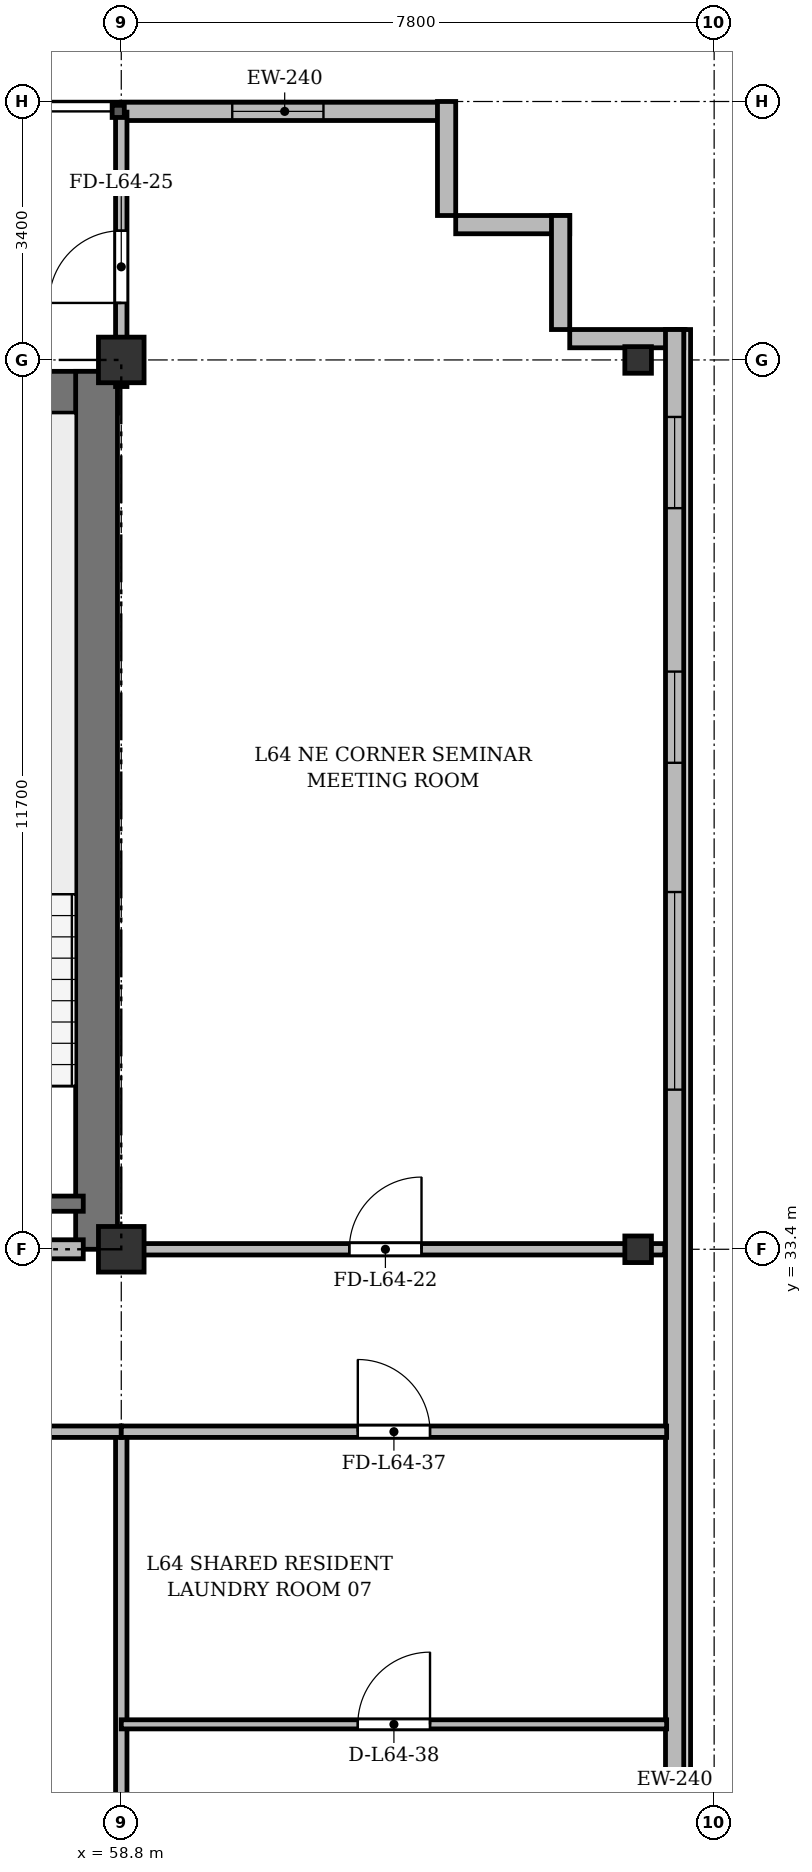
"""IFC4 building model, lengths in metres.
Left out: names, types, materials, properties, quantities, classifications, styles, units other than length and angle.
Written with IfcOpenShell. Run it as: python <this file> out.ifc"""

import sys

from ifc_helpers import new_model, si_unit, direction, frame, frame_2d, origin, origin_2d, place, context, subcontext, project, spatial, rectangle, i_section, extrude, source, transform, mapped, element, fill, save


model = new_model("IFC4")
c1 = context("Model", 3, precision=1e-05, world=origin(), true_north=direction((0.0, 1.0)))
c2 = subcontext(c1, "Body", "Model", "MODEL_VIEW")
j1 = project(units=[si_unit("LENGTHUNIT", "METRE"), si_unit("PLANEANGLEUNIT", "RADIAN")], contexts=[c1])
p1 = place(None, origin())
s1 = spatial("IfcSite", under=j1, at=p1, CompositionType="ELEMENT")
p2 = place(p1, origin())
s2 = spatial("IfcBuilding", under=s1, at=p2, CompositionType="ELEMENT")
p3 = place(p2, frame((0.0, 0.0, 248.7)))
s3 = spatial("IfcBuildingStorey", under=s2, at=p3, CompositionType="ELEMENT", Elevation=248.7)
m1 = source(origin(), c2, "Body", "SweptSolid", [
    extrude(rectangle(XDim=0.6, YDim=0.6, at=origin_2d()), origin(), (0.0, 0.0, 1.0), 3.6),
])
for number, where, z_axis, x_axis in (
    (1, (58.8, 33.4, 0.0), (0.0, 0.0, 1.0), (1.0, 0.0, 0.0)),
    (2, (58.8, 45.1, 0.0), (0.0, 0.0, 1.0), (1.0, 0.0, 0.0)),
):
    element("IfcColumn", number, at=place(p3, frame(where, z_axis=z_axis, x_axis=x_axis)), inside=s3, PredefinedType="COLUMN", context=c2, shape_type="MappedRepresentation", body=[
        mapped(m1, transform((0.0, 0.0, 0.0), x_axis=(1.0, 0.0, 0.0), y_axis=(0.0, 1.0, 0.0), z_axis=(0.0, 0.0, 1.0), scale=1.0)),
    ])
m2 = source(origin(), c2, "Body", "SweptSolid", [
    extrude(i_section(OverallWidth=0.35, OverallDepth=0.35, WebThickness=0.018, FlangeThickness=0.028, at=origin_2d()), origin(), (0.0, 0.0, 1.0), 3.6),
])
for number, where, z_axis, x_axis in (
    (3, (65.6, 33.4, 0.0), (0.0, 0.0, 1.0), (1.0, 0.0, 0.0)),
    (4, (65.6, 45.1, 0.0), (0.0, 0.0, 1.0), (1.0, 0.0, 0.0)),
):
    element("IfcColumn", number, at=place(p3, frame(where, z_axis=z_axis, x_axis=x_axis)), inside=s3, PredefinedType="COLUMN", context=c2, shape_type="MappedRepresentation", body=[
        mapped(m2, transform((0.0, 0.0, 0.0), x_axis=(1.0, 0.0, 0.0), y_axis=(0.0, 1.0, 0.0), z_axis=(0.0, 0.0, 1.0), scale=1.0)),
    ])
p4 = place(p3, frame((58.8, 48.37, 0.0), z_axis=(0.0, 0.0, 1.0), x_axis=(1.0, 0.0, 0.0)))
e5 = element("IfcWall", 5, at=p4, inside=s3, PredefinedType="SOLIDWALL", context=c2, shape_type="SweptSolid", body=[
    extrude(rectangle(XDim=4.3, YDim=0.24, at=frame_2d((2.15, 0.0))), origin(), (0.0, 0.0, 1.0), 3.37),
])
p5 = place(p4, frame((1.46, 0.0, 0.9)))
e6 = element("IfcOpeningElement", 6, at=p5, cuts=e5, PredefinedType="OPENING", context=c2, shape_type="SweptSolid", body=[
    extrude(rectangle(XDim=1.2, YDim=1.65, at=frame_2d((0.6, 0.825))), frame((0.0, 0.13, 0.0), z_axis=(0.0, -1.0, 0.0), x_axis=(1.0, 0.0, 0.0)), (0.0, 0.0, 1.0), 0.26),
])
for number, where, z_axis, x_axis in (
    (7, (63.08, 48.5, 0.0), (0.0, 0.0, 1.0), (0.0, -1.0, 0.0)),
    (8, (63.2, 46.88, 0.0), (0.0, 0.0, 1.0), (1.0, 0.0, 0.0)),
    (9, (64.58, 47.0, 0.0), (0.0, 0.0, 1.0), (0.0, -1.0, 0.0)),
    (10, (64.7, 45.38, 0.0), (0.0, 0.0, 1.0), (1.0, 0.0, 0.0)),
):
    element("IfcWall", number, at=place(p3, frame(where, z_axis=z_axis, x_axis=x_axis)), inside=s3, PredefinedType="SOLIDWALL", context=c2, shape_type="SweptSolid", body=[
        extrude(rectangle(XDim=1.5, YDim=0.24, at=frame_2d((0.75, 0.0))), origin(), (0.0, 0.0, 1.0), 3.37),
    ])
p6 = place(p3, frame((66.08, 45.5, 0.0), z_axis=(0.0, 0.0, 1.0), x_axis=(0.0, -1.0, 0.0)))
e11 = element("IfcWall", 11, at=p6, inside=s3, PredefinedType="SOLIDWALL", context=c2, shape_type="SweptSolid", body=[
    extrude(rectangle(XDim=39.0, YDim=0.24, at=frame_2d((19.5, 0.0))), origin(), (0.0, 0.0, 1.0), 3.37),
])
p7 = place(p6, frame((36.35, 0.0, 0.92)))
e12 = element("IfcOpeningElement", 12, at=p7, cuts=e11, PredefinedType="OPENING", context=c2, shape_type="SweptSolid", body=[
    extrude(rectangle(XDim=1.2, YDim=1.65, at=frame_2d((0.6, 0.825))), frame((0.0, 0.13, 0.0), z_axis=(0.0, -1.0, 0.0), x_axis=(1.0, 0.0, 0.0)), (0.0, 0.0, 1.0), 0.26),
])
p8 = place(p6, frame((32.8, 0.0, 0.92)))
e13 = element("IfcOpeningElement", 13, at=p8, cuts=e11, PredefinedType="OPENING", context=c2, shape_type="SweptSolid", body=[
    extrude(rectangle(XDim=2.6, YDim=1.9, at=frame_2d((1.3, 0.95))), frame((0.0, 0.13, 0.0), z_axis=(0.0, -1.0, 0.0), x_axis=(1.0, 0.0, 0.0)), (0.0, 0.0, 1.0), 0.26),
])
p9 = place(p6, frame((28.6, 0.0, 0.92)))
e14 = element("IfcOpeningElement", 14, at=p9, cuts=e11, PredefinedType="OPENING", context=c2, shape_type="SweptSolid", body=[
    extrude(rectangle(XDim=2.6, YDim=1.9, at=frame_2d((1.3, 0.95))), frame((0.0, 0.13, 0.0), z_axis=(0.0, -1.0, 0.0), x_axis=(1.0, 0.0, 0.0)), (0.0, 0.0, 1.0), 0.26),
])
p10 = place(p6, frame((21.4, 0.0, 0.92)))
e15 = element("IfcOpeningElement", 15, at=p10, cuts=e11, PredefinedType="OPENING", context=c2, shape_type="SweptSolid", body=[
    extrude(rectangle(XDim=2.6, YDim=1.9, at=frame_2d((1.3, 0.95))), frame((0.0, 0.13, 0.0), z_axis=(0.0, -1.0, 0.0), x_axis=(1.0, 0.0, 0.0)), (0.0, 0.0, 1.0), 0.26),
])
p11 = place(p6, frame((7.4, 0.0, 0.92)))
e16 = element("IfcOpeningElement", 16, at=p11, cuts=e11, PredefinedType="OPENING", context=c2, shape_type="SweptSolid", body=[
    extrude(rectangle(XDim=2.6, YDim=1.9, at=frame_2d((1.3, 0.95))), frame((0.0, 0.13, 0.0), z_axis=(0.0, -1.0, 0.0), x_axis=(1.0, 0.0, 0.0)), (0.0, 0.0, 1.0), 0.26),
])
p12 = place(p6, frame((4.5, 0.0, 0.92)))
e17 = element("IfcOpeningElement", 17, at=p12, cuts=e11, PredefinedType="OPENING", context=c2, shape_type="SweptSolid", body=[
    extrude(rectangle(XDim=1.2, YDim=1.65, at=frame_2d((0.6, 0.825))), frame((0.0, 0.13, 0.0), z_axis=(0.0, -1.0, 0.0), x_axis=(1.0, 0.0, 0.0)), (0.0, 0.0, 1.0), 0.26),
])
p13 = place(p6, frame((1.15, 0.0, 0.92)))
e18 = element("IfcOpeningElement", 18, at=p13, cuts=e11, PredefinedType="OPENING", context=c2, shape_type="SweptSolid", body=[
    extrude(rectangle(XDim=1.2, YDim=1.65, at=frame_2d((0.6, 0.825))), frame((0.0, 0.13, 0.0), z_axis=(0.0, -1.0, 0.0), x_axis=(1.0, 0.0, 0.0)), (0.0, 0.0, 1.0), 0.26),
])
p14 = place(p3, frame((15.65, 44.675, 0.0), z_axis=(0.0, 0.0, 1.0), x_axis=(1.0, 0.0, 0.0)))
e19 = element("IfcWall", 19, at=p14, inside=s3, PredefinedType="SHEAR", context=c2, shape_type="SweptSolid", body=[
    extrude(rectangle(XDim=43.1, YDim=0.55, at=frame_2d((21.55, 0.0))), origin(), (0.0, 0.0, 1.0), 3.37),
])
p15 = place(p3, frame((58.475, 33.4, 0.0), z_axis=(0.0, 0.0, 1.0), x_axis=(0.0, 1.0, 0.0)))
e20 = element("IfcWall", 20, at=p15, inside=s3, PredefinedType="SHEAR", context=c2, shape_type="SweptSolid", body=[
    extrude(rectangle(XDim=11.55, YDim=0.55, at=frame_2d((5.775, 0.0))), origin(), (0.0, 0.0, 1.0), 3.37),
])
p16 = place(p3, frame((54.9, 34.0, 0.0), z_axis=(0.0, 0.0, 1.0), x_axis=(1.0, 0.0, 0.0)))
e21 = element("IfcWall", 21, at=p16, inside=s3, PredefinedType="SHEAR", context=c2, shape_type="SweptSolid", body=[
    extrude(rectangle(XDim=3.4, YDim=0.2, at=frame_2d((1.7, 0.0))), origin(), (0.0, 0.0, 1.0), 3.37),
])
p17 = place(p3, frame((47.15, 33.4, 0.0), z_axis=(0.0, 0.0, 1.0), x_axis=(1.0, 0.0, 0.0)))
e22 = element("IfcWall", 22, at=p17, inside=s3, PredefinedType="PARTITIONING", context=c2, shape_type="SweptSolid", body=[
    extrude(rectangle(XDim=11.15, YDim=0.25, at=frame_2d((5.575, 0.0))), origin(), (0.0, 0.0, 1.0), 2.92),
])
p18 = place(p17, frame((0.7, 0.0, 0.0)))
e23 = element("IfcOpeningElement", 23, at=p18, cuts=e22, PredefinedType="OPENING", context=c2, shape_type="SweptSolid", body=[
    extrude(rectangle(XDim=0.95, YDim=2.15, at=frame_2d((0.475, 1.075))), frame((0.0, 0.135, 0.0), z_axis=(0.0, -1.0, 0.0), x_axis=(1.0, 0.0, 0.0)), (0.0, 0.0, 1.0), 0.27),
])
p19 = place(p17, frame((6.0, 0.0, 0.0)))
e24 = element("IfcOpeningElement", 24, at=p19, cuts=e22, PredefinedType="OPENING", context=c2, shape_type="SweptSolid", body=[
    extrude(rectangle(XDim=1.2, YDim=2.15, at=frame_2d((0.6, 1.075))), frame((0.0, 0.135, 0.0), z_axis=(0.0, -1.0, 0.0), x_axis=(1.0, 0.0, 0.0)), (0.0, 0.0, 1.0), 0.27),
])
p20 = place(p3, frame((58.8, 33.4, 0.0), z_axis=(0.0, 0.0, 1.0), x_axis=(1.0, 0.0, 0.0)))
e25 = element("IfcWall", 25, at=p20, inside=s3, PredefinedType="PARTITIONING", context=c2, shape_type="SweptSolid", body=[
    extrude(rectangle(XDim=7.15, YDim=0.15, at=frame_2d((3.575, 0.0))), origin(), (0.0, 0.0, 1.0), 2.92),
])
p21 = place(p20, frame((3.0, 0.0, 0.0)))
e26 = element("IfcOpeningElement", 26, at=p21, cuts=e25, PredefinedType="OPENING", context=c2, shape_type="SweptSolid", body=[
    extrude(rectangle(XDim=0.95, YDim=2.15, at=frame_2d((0.475, 1.075))), frame((0.0, 0.085, 0.0), z_axis=(0.0, -1.0, 0.0), x_axis=(1.0, 0.0, 0.0)), (0.0, 0.0, 1.0), 0.17),
])
p22 = place(p3, frame((58.8, 44.75, 0.0), z_axis=(0.0, 0.0, 1.0), x_axis=(0.0, 1.0, 0.0)))
e27 = element("IfcWall", 27, at=p22, inside=s3, PredefinedType="PARTITIONING", context=c2, shape_type="SweptSolid", body=[
    extrude(rectangle(XDim=3.61, YDim=0.15, at=frame_2d((1.805, 0.0))), origin(), (0.0, 0.0, 1.0), 2.87),
])
p23 = place(p22, frame((1.1, 0.0, 0.0)))
e28 = element("IfcOpeningElement", 28, at=p23, cuts=e27, PredefinedType="OPENING", context=c2, shape_type="SweptSolid", body=[
    extrude(rectangle(XDim=0.95, YDim=2.15, at=frame_2d((0.475, 1.075))), frame((0.0, 0.085, 0.0), z_axis=(0.0, -1.0, 0.0), x_axis=(1.0, 0.0, 0.0)), (0.0, 0.0, 1.0), 0.17),
])
p24 = place(p3, frame((58.8, 3.725, 0.0), z_axis=(0.0, 0.0, 1.0), x_axis=(0.0, 1.0, 0.0)))
e29 = element("IfcWall", 29, at=p24, inside=s3, PredefinedType="PARTITIONING", context=c2, shape_type="SweptSolid", body=[
    extrude(rectangle(XDim=27.275, YDim=0.15, at=frame_2d((13.637, 0.0))), origin(), (0.0, 0.0, 1.0), 2.87),
])
p25 = place(p3, frame((51.0, 31.0, 0.0), z_axis=(0.0, 0.0, 1.0), x_axis=(1.0, 0.0, 0.0)))
e30 = element("IfcWall", 30, at=p25, inside=s3, PredefinedType="PARTITIONING", context=c2, shape_type="SweptSolid", body=[
    extrude(rectangle(XDim=7.8, YDim=0.15, at=frame_2d((3.9, 0.0))), origin(), (0.0, 0.0, 1.0), 2.87),
])
p26 = place(p25, frame((3.333, 0.0, 0.0)))
e31 = element("IfcOpeningElement", 31, at=p26, cuts=e30, PredefinedType="OPENING", context=c2, shape_type="SweptSolid", body=[
    extrude(rectangle(XDim=0.95, YDim=2.15, at=frame_2d((0.475, 1.075))), frame((0.0, 0.085, 0.0), z_axis=(0.0, -1.0, 0.0), x_axis=(1.0, 0.0, 0.0)), (0.0, 0.0, 1.0), 0.17),
])
p27 = place(p3, frame((58.8, 31.0, 0.0), z_axis=(0.0, 0.0, 1.0), x_axis=(1.0, 0.0, 0.0)))
e32 = element("IfcWall", 32, at=p27, inside=s3, PredefinedType="PARTITIONING", context=c2, shape_type="SweptSolid", body=[
    extrude(rectangle(XDim=7.175, YDim=0.15, at=frame_2d((3.587, 0.0))), origin(), (0.0, 0.0, 1.0), 2.87),
])
p28 = place(p27, frame((3.112, 0.0, 0.0)))
e33 = element("IfcOpeningElement", 33, at=p28, cuts=e32, PredefinedType="OPENING", context=c2, shape_type="SweptSolid", body=[
    extrude(rectangle(XDim=0.95, YDim=2.15, at=frame_2d((0.475, 1.075))), frame((0.0, 0.085, 0.0), z_axis=(0.0, -1.0, 0.0), x_axis=(1.0, 0.0, 0.0)), (0.0, 0.0, 1.0), 0.17),
])
p29 = place(p3, frame((58.8, 27.15, 0.0), z_axis=(0.0, 0.0, 1.0), x_axis=(1.0, 0.0, 0.0)))
e34 = element("IfcWall", 34, at=p29, inside=s3, PredefinedType="PARTITIONING", context=c2, shape_type="SweptSolid", body=[
    extrude(rectangle(XDim=7.175, YDim=0.12, at=frame_2d((3.587, 0.0))), origin(), (0.0, 0.0, 1.0), 2.87),
])
p30 = place(p29, frame((3.112, 0.0, 0.0)))
e35 = element("IfcOpeningElement", 35, at=p30, cuts=e34, PredefinedType="OPENING", context=c2, shape_type="SweptSolid", body=[
    extrude(rectangle(XDim=0.95, YDim=2.15, at=frame_2d((0.475, 1.075))), frame((0.0, 0.07, 0.0), z_axis=(0.0, -1.0, 0.0), x_axis=(1.0, 0.0, 0.0)), (0.0, 0.0, 1.0), 0.14),
])
m3 = source(origin(), c2, "Body", "SweptSolid", [
    extrude(rectangle(XDim=1.2, YDim=1.65, at=frame_2d((0.6, 0.825))), frame((0.0, 0.03, 0.0), z_axis=(0.0, -1.0, 0.0), x_axis=(1.0, 0.0, 0.0)), (0.0, 0.0, 1.0), 0.06),
])
p31 = place(p5, origin())
e36 = element("IfcWindow", 36, at=p31, inside=s3, PartitioningType="SINGLE_PANEL", PredefinedType="WINDOW", context=c2, shape_type="MappedRepresentation", body=[
    mapped(m3, transform((0.0, 0.0, 0.0), x_axis=(1.0, 0.0, 0.0), y_axis=(0.0, 1.0, 0.0), z_axis=(0.0, 0.0, 1.0), scale=1.0)),
])
fill(e6, e36)
m4 = source(origin(), c2, "Body", "SweptSolid", [
    extrude(rectangle(XDim=2.6, YDim=1.9, at=frame_2d((1.3, 0.95))), frame((0.0, 0.03, 0.0), z_axis=(0.0, -1.0, 0.0), x_axis=(1.0, 0.0, 0.0)), (0.0, 0.0, 1.0), 0.06),
])
p32 = place(p11, origin())
e37 = element("IfcWindow", 37, at=p32, inside=s3, PartitioningType="SINGLE_PANEL", PredefinedType="WINDOW", context=c2, shape_type="MappedRepresentation", body=[
    mapped(m4, transform((0.0, 0.0, 0.0), x_axis=(1.0, 0.0, 0.0), y_axis=(0.0, 1.0, 0.0), z_axis=(0.0, 0.0, 1.0), scale=1.0)),
])
fill(e16, e37)
p33 = place(p12, origin())
e38 = element("IfcWindow", 38, at=p33, inside=s3, PartitioningType="SINGLE_PANEL", PredefinedType="WINDOW", context=c2, shape_type="MappedRepresentation", body=[
    mapped(m3, transform((0.0, 0.0, 0.0), x_axis=(1.0, 0.0, 0.0), y_axis=(0.0, 1.0, 0.0), z_axis=(0.0, 0.0, 1.0), scale=1.0)),
])
fill(e17, e38)
p34 = place(p13, origin())
e39 = element("IfcWindow", 39, at=p34, inside=s3, PartitioningType="SINGLE_PANEL", PredefinedType="WINDOW", context=c2, shape_type="MappedRepresentation", body=[
    mapped(m3, transform((0.0, 0.0, 0.0), x_axis=(1.0, 0.0, 0.0), y_axis=(0.0, 1.0, 0.0), z_axis=(0.0, 0.0, 1.0), scale=1.0)),
])
fill(e18, e39)
m5 = source(origin(), c2, "Body", "SweptSolid", [
    extrude(rectangle(XDim=0.95, YDim=2.15, at=frame_2d((0.475, 1.075))), frame((0.0, 0.025, 0.0), z_axis=(0.0, -1.0, 0.0), x_axis=(1.0, 0.0, 0.0)), (0.0, 0.0, 1.0), 0.05),
])
p35 = place(p21, origin())
e40 = element("IfcDoor", 40, at=p35, inside=s3, OperationType="SINGLE_SWING_RIGHT", PredefinedType="DOOR", context=c2, shape_type="MappedRepresentation", body=[
    mapped(m5, transform((0.0, 0.0, 0.0), x_axis=(1.0, 0.0, 0.0), y_axis=(0.0, 1.0, 0.0), z_axis=(0.0, 0.0, 1.0), scale=1.0)),
])
fill(e26, e40)
p36 = place(p23, origin())
e41 = element("IfcDoor", 41, at=p36, inside=s3, OperationType="SINGLE_SWING_LEFT", PredefinedType="DOOR", context=c2, shape_type="MappedRepresentation", body=[
    mapped(m5, transform((0.0, 0.0, 0.0), x_axis=(1.0, 0.0, 0.0), y_axis=(0.0, 1.0, 0.0), z_axis=(0.0, 0.0, 1.0), scale=1.0)),
])
fill(e28, e41)
p37 = place(p28, origin())
e42 = element("IfcDoor", 42, at=p37, inside=s3, OperationType="SINGLE_SWING_LEFT", PredefinedType="DOOR", context=c2, shape_type="MappedRepresentation", body=[
    mapped(m5, transform((0.0, 0.0, 0.0), x_axis=(1.0, 0.0, 0.0), y_axis=(0.0, 1.0, 0.0), z_axis=(0.0, 0.0, 1.0), scale=1.0)),
])
fill(e33, e42)
p38 = place(p30, origin())
e43 = element("IfcDoor", 43, at=p38, inside=s3, OperationType="SINGLE_SWING_RIGHT", PredefinedType="DOOR", context=c2, shape_type="MappedRepresentation", body=[
    mapped(m5, transform((0.0, 0.0, 0.0), x_axis=(1.0, 0.0, 0.0), y_axis=(0.0, 1.0, 0.0), z_axis=(0.0, 0.0, 1.0), scale=1.0)),
])
fill(e35, e43)
save(model, sys.argv[1])
